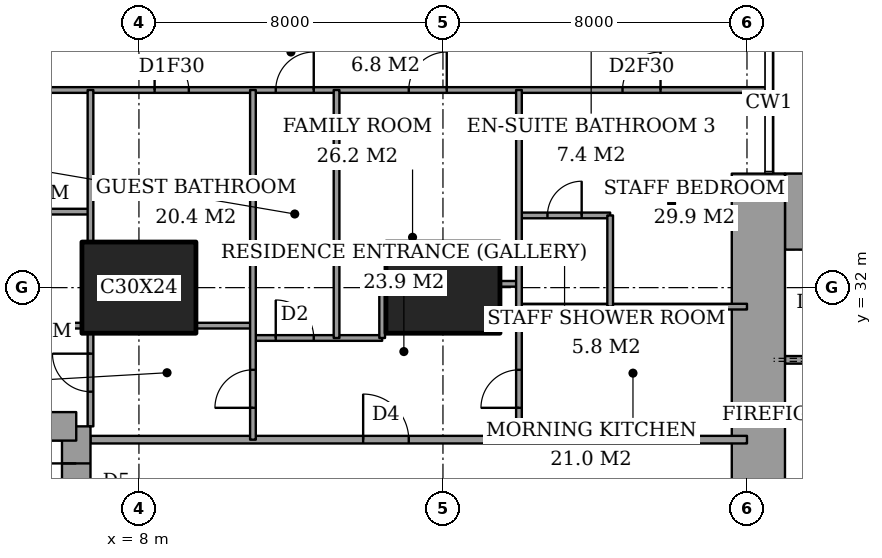
"""IFC4 building model, lengths in metres.
Left out: names, types, materials, properties, quantities, classifications, styles, units other than length and angle.
Written with IfcOpenShell. Run it as: python <this file> out.ifc"""

import sys

from ifc_helpers import new_model, si_unit, direction, frame, frame_2d, origin, origin_2d, place, context, subcontext, project, spatial, rectangle, extrude, element, fill, save


model = new_model("IFC4")
c1 = context("Model", 3, precision=1e-05, world=origin(), true_north=direction((0.0, 1.0)))
c2 = subcontext(c1, "Body", "Model", "MODEL_VIEW")
j1 = project(units=[si_unit("LENGTHUNIT", "METRE"), si_unit("PLANEANGLEUNIT", "RADIAN")], contexts=[c1])
p1 = place(None, origin())
s1 = spatial("IfcSite", under=j1, at=p1, CompositionType="ELEMENT")
p2 = place(p1, origin())
s2 = spatial("IfcBuilding", under=s1, at=p2, CompositionType="ELEMENT")
p3 = place(p2, frame((0.0, 0.0, 110.6)))
s3 = spatial("IfcBuildingStorey", under=s2, at=p3, CompositionType="ELEMENT", Elevation=110.6)
for number, where, z_axis, x_axis in (
    (1, (8.0, 32.0, 0.0), (0.0, 0.0, 1.0), (1.0, 0.0, 0.0)),
    (2, (16.0, 32.0, 0.0), (0.0, 0.0, 1.0), (1.0, 0.0, 0.0)),
):
    element("IfcColumn", number, at=place(p3, frame(where, z_axis=z_axis, x_axis=x_axis)), inside=s3, PredefinedType="COLUMN", context=c2, shape_type="SweptSolid", body=[
        extrude(rectangle(XDim=3.0, YDim=2.4, at=origin_2d()), origin(), (0.0, 0.0, 1.0), 3.6),
    ])
p4 = place(p3, frame((25.0, 34.0, 0.0), z_axis=(0.0, 0.0, 1.0), x_axis=(1.0, 0.0, 0.0)))
e3 = element("IfcWall", 3, at=p4, inside=s3, PredefinedType="SHEAR", context=c2, shape_type="SweptSolid", body=[
    extrude(rectangle(XDim=3.15, YDim=2.0, at=frame_2d((1.575, 0.0))), origin(), (0.0, 0.0, 1.0), 3.6),
])
p5 = place(p3, frame((24.3, 23.15, 0.0), z_axis=(0.0, 0.0, 1.0), x_axis=(0.0, 1.0, 0.0)))
e4 = element("IfcWall", 4, at=p5, inside=s3, PredefinedType="SHEAR", context=c2, shape_type="SweptSolid", body=[
    extrude(rectangle(XDim=11.85, YDim=1.4, at=frame_2d((5.925, 0.0))), origin(), (0.0, 0.0, 1.0), 3.6),
])
p6 = place(p5, frame((0.75, 0.0, 0.0)))
e5 = element("IfcOpeningElement", 5, at=p6, cuts=e4, PredefinedType="OPENING", context=c2, shape_type="SweptSolid", body=[
    extrude(rectangle(XDim=1.8, YDim=2.4, at=frame_2d((0.9, 1.2))), frame((0.0, 0.71, 0.0), z_axis=(0.0, -1.0, 0.0), x_axis=(1.0, 0.0, 0.0)), (0.0, 0.0, 1.0), 1.42),
])
p7 = place(p3, frame((6.35, 19.65, 0.0), z_axis=(0.0, 0.0, 1.0), x_axis=(0.0, 1.0, 0.0)))
e6 = element("IfcWall", 6, at=p7, inside=s3, PredefinedType="SHEAR", context=c2, shape_type="SweptSolid", body=[
    extrude(rectangle(XDim=8.7, YDim=0.75, at=frame_2d((4.35, 0.0))), origin(), (0.0, 0.0, 1.0), 3.6),
])
p8 = place(p7, frame((6.725, 0.0, 0.0)))
e7 = element("IfcOpeningElement", 7, at=p8, cuts=e6, PredefinedType="OPENING", context=c2, shape_type="SweptSolid", body=[
    extrude(rectangle(XDim=1.0, YDim=2.1, at=frame_2d((0.5, 1.05))), frame((0.0, 0.385, 0.0), z_axis=(0.0, -1.0, 0.0), x_axis=(1.0, 0.0, 0.0)), (0.0, 0.0, 1.0), 0.77),
])
p9 = place(p3, frame((6.35, 28.35, 0.0), z_axis=(0.0, 0.0, 1.0), x_axis=(-1.0, 0.0, 0.0)))
e8 = element("IfcWall", 8, at=p9, inside=s3, PredefinedType="SHEAR", context=c2, shape_type="SweptSolid", body=[
    extrude(rectangle(XDim=4.45, YDim=0.75, at=frame_2d((2.225, 0.0))), origin(), (0.0, 0.0, 1.0), 3.6),
])
p10 = place(p3, frame((6.725, 28.0, 0.0), z_axis=(0.0, 0.0, 1.0), x_axis=(1.0, 0.0, 0.0)))
e9 = element("IfcWall", 9, at=p10, inside=s3, PredefinedType="PARTITIONING", context=c2, shape_type="SweptSolid", body=[
    extrude(rectangle(XDim=17.275, YDim=0.2, at=frame_2d((8.637, 0.0))), origin(), (0.0, 0.0, 1.0), 3.35),
])
p11 = place(p10, frame((7.175, 0.0, 0.0)))
e10 = element("IfcOpeningElement", 10, at=p11, cuts=e9, PredefinedType="OPENING", context=c2, shape_type="SweptSolid", body=[
    extrude(rectangle(XDim=1.2, YDim=2.4, at=frame_2d((0.6, 1.2))), frame((0.0, 0.11, 0.0), z_axis=(0.0, -1.0, 0.0), x_axis=(1.0, 0.0, 0.0)), (0.0, 0.0, 1.0), 0.22),
])
p12 = place(p3, frame((11.0, 30.675, 0.0), z_axis=(0.0, 0.0, 1.0), x_axis=(1.0, 0.0, 0.0)))
e11 = element("IfcWall", 11, at=p12, inside=s3, PredefinedType="PARTITIONING", context=c2, shape_type="SweptSolid", body=[
    extrude(rectangle(XDim=3.4, YDim=0.15, at=frame_2d((1.7, 0.0))), origin(), (0.0, 0.0, 1.0), 3.35),
])
p13 = place(p12, frame((0.6, 0.0, 0.0)))
e12 = element("IfcOpeningElement", 12, at=p13, cuts=e11, PredefinedType="OPENING", context=c2, shape_type="SweptSolid", body=[
    extrude(rectangle(XDim=1.0, YDim=2.1, at=frame_2d((0.5, 1.05))), frame((0.0, 0.085, 0.0), z_axis=(0.0, -1.0, 0.0), x_axis=(1.0, 0.0, 0.0)), (0.0, 0.0, 1.0), 0.17),
])
p14 = place(p3, frame((1.35, 31.0, 0.0), z_axis=(0.0, 0.0, 1.0), x_axis=(1.0, 0.0, 0.0)))
e13 = element("IfcWall", 13, at=p14, inside=s3, PredefinedType="PARTITIONING", context=c2, shape_type="SweptSolid", body=[
    extrude(rectangle(XDim=5.15, YDim=0.15, at=frame_2d((2.575, 0.0))), origin(), (0.0, 0.0, 1.0), 3.35),
])
p15 = place(p3, frame((9.5, 31.0, 0.0), z_axis=(0.0, 0.0, 1.0), x_axis=(1.0, 0.0, 0.0)))
e14 = element("IfcWall", 14, at=p15, inside=s3, PredefinedType="PARTITIONING", context=c2, shape_type="SweptSolid", body=[
    extrude(rectangle(XDim=1.5, YDim=0.15, at=frame_2d((0.75, 0.0))), origin(), (0.0, 0.0, 1.0), 3.35),
])
p16 = place(p3, frame((18.0, 31.5, 0.0), z_axis=(0.0, 0.0, 1.0), x_axis=(1.0, 0.0, 0.0)))
e15 = element("IfcWall", 15, at=p16, inside=s3, PredefinedType="PARTITIONING", context=c2, shape_type="SweptSolid", body=[
    extrude(rectangle(XDim=6.0, YDim=0.15, at=frame_2d((3.0, 0.0))), origin(), (0.0, 0.0, 1.0), 3.35),
])
p17 = place(p3, frame((17.5, 32.1, 0.0), z_axis=(0.0, 0.0, 1.0), x_axis=(1.0, 0.0, 0.0)))
e16 = element("IfcWall", 16, at=p17, inside=s3, PredefinedType="PARTITIONING", context=c2, shape_type="SweptSolid", body=[
    extrude(rectangle(XDim=0.5, YDim=0.15, at=frame_2d((0.25, 0.0))), origin(), (0.0, 0.0, 1.0), 2.634),
])
p18 = place(p3, frame((18.0, 33.9, 0.0), z_axis=(0.0, 0.0, 1.0), x_axis=(1.0, 0.0, 0.0)))
e17 = element("IfcWall", 17, at=p18, inside=s3, PredefinedType="PARTITIONING", context=c2, shape_type="SweptSolid", body=[
    extrude(rectangle(XDim=2.4, YDim=0.15, at=frame_2d((1.2, 0.0))), origin(), (0.0, 0.0, 1.0), 3.35),
])
p19 = place(p18, frame((0.75, 0.0, 0.0)))
e18 = element("IfcOpeningElement", 18, at=p19, cuts=e17, PredefinedType="OPENING", context=c2, shape_type="SweptSolid", body=[
    extrude(rectangle(XDim=0.9, YDim=2.1, at=frame_2d((0.45, 1.05))), frame((0.0, 0.085, 0.0), z_axis=(0.0, -1.0, 0.0), x_axis=(1.0, 0.0, 0.0)), (0.0, 0.0, 1.0), 0.17),
])
p20 = place(p3, frame((4.125, 34.0, 0.0), z_axis=(0.0, 0.0, 1.0), x_axis=(1.0, 0.0, 0.0)))
e19 = element("IfcWall", 19, at=p20, inside=s3, PredefinedType="PARTITIONING", context=c2, shape_type="SweptSolid", body=[
    extrude(rectangle(XDim=2.6, YDim=0.15, at=frame_2d((1.3, 0.0))), origin(), (0.0, 0.0, 1.0), 3.35),
])
p21 = place(p3, frame((-0.45, 37.2, 0.0), z_axis=(0.0, 0.0, 1.0), x_axis=(1.0, 0.0, 0.0)))
e20 = element("IfcWall", 20, at=p21, inside=s3, PredefinedType="PARTITIONING", context=c2, shape_type="SweptSolid", body=[
    extrude(rectangle(XDim=25.011, YDim=0.15, at=frame_2d((12.505, 0.0))), origin(), (0.0, 0.0, 1.0), 3.35),
])
p22 = place(p21, frame((12.05, 0.0, 0.0)))
e21 = element("IfcOpeningElement", 21, at=p22, cuts=e20, PredefinedType="OPENING", context=c2, shape_type="SweptSolid", body=[
    extrude(rectangle(XDim=1.0, YDim=2.1, at=frame_2d((0.5, 1.05))), frame((0.0, 0.085, 0.0), z_axis=(0.0, -1.0, 0.0), x_axis=(1.0, 0.0, 0.0)), (0.0, 0.0, 1.0), 0.17),
])
p23 = place(p21, frame((3.087, 0.0, 0.0)))
e22 = element("IfcOpeningElement", 22, at=p23, cuts=e20, PredefinedType="OPENING", context=c2, shape_type="SweptSolid", body=[
    extrude(rectangle(XDim=1.0, YDim=2.1, at=frame_2d((0.5, 1.05))), frame((0.0, 0.085, 0.0), z_axis=(0.0, -1.0, 0.0), x_axis=(1.0, 0.0, 0.0)), (0.0, 0.0, 1.0), 0.17),
])
p24 = place(p21, frame((8.863, 0.0, 0.0)))
e23 = element("IfcOpeningElement", 23, at=p24, cuts=e20, PredefinedType="OPENING", context=c2, shape_type="SweptSolid", body=[
    extrude(rectangle(XDim=0.9, YDim=2.1, at=frame_2d((0.45, 1.05))), frame((0.0, 0.085, 0.0), z_axis=(0.0, -1.0, 0.0), x_axis=(1.0, 0.0, 0.0)), (0.0, 0.0, 1.0), 0.17),
])
p25 = place(p21, frame((15.55, 0.0, 0.0)))
e24 = element("IfcOpeningElement", 24, at=p25, cuts=e20, PredefinedType="OPENING", context=c2, shape_type="SweptSolid", body=[
    extrude(rectangle(XDim=1.0, YDim=2.1, at=frame_2d((0.5, 1.05))), frame((0.0, 0.085, 0.0), z_axis=(0.0, -1.0, 0.0), x_axis=(1.0, 0.0, 0.0)), (0.0, 0.0, 1.0), 0.17),
])
p26 = place(p21, frame((21.175, 0.0, 0.0)))
e25 = element("IfcOpeningElement", 25, at=p26, cuts=e20, PredefinedType="OPENING", context=c2, shape_type="SweptSolid", body=[
    extrude(rectangle(XDim=1.0, YDim=2.1, at=frame_2d((0.5, 1.05))), frame((0.0, 0.085, 0.0), z_axis=(0.0, -1.0, 0.0), x_axis=(1.0, 0.0, 0.0)), (0.0, 0.0, 1.0), 0.17),
])
p27 = place(p3, frame((6.725, 28.35, 0.0), z_axis=(0.0, 0.0, 1.0), x_axis=(0.0, 1.0, 0.0)))
e26 = element("IfcWall", 26, at=p27, inside=s3, PredefinedType="PARTITIONING", context=c2, shape_type="SweptSolid", body=[
    extrude(rectangle(XDim=2.45, YDim=0.15, at=frame_2d((1.225, 0.0))), origin(), (0.0, 0.0, 1.0), 3.35),
])
p28 = place(p27, frame((0.913, 0.0, 0.0)))
e27 = element("IfcOpeningElement", 27, at=p28, cuts=e26, PredefinedType="OPENING", context=c2, shape_type="SweptSolid", body=[
    extrude(rectangle(XDim=1.0, YDim=2.1, at=frame_2d((0.5, 1.05))), frame((0.0, 0.085, 0.0), z_axis=(0.0, -1.0, 0.0), x_axis=(1.0, 0.0, 0.0)), (0.0, 0.0, 1.0), 0.17),
])
p29 = place(p3, frame((6.725, 33.2, 0.0), z_axis=(0.0, 0.0, 1.0), x_axis=(0.0, 1.0, 0.0)))
e28 = element("IfcWall", 28, at=p29, inside=s3, PredefinedType="PARTITIONING", context=c2, shape_type="SweptSolid", body=[
    extrude(rectangle(XDim=4.0, YDim=0.15, at=frame_2d((2.0, 0.0))), origin(), (0.0, 0.0, 1.0), 3.35),
])
p30 = place(p3, frame((11.0, 28.0, 0.0), z_axis=(0.0, 0.0, 1.0), x_axis=(0.0, 1.0, 0.0)))
e29 = element("IfcWall", 29, at=p30, inside=s3, PredefinedType="PARTITIONING", context=c2, shape_type="SweptSolid", body=[
    extrude(rectangle(XDim=9.2, YDim=0.15, at=frame_2d((4.6, 0.0))), origin(), (0.0, 0.0, 1.0), 3.35),
])
p31 = place(p30, frame((0.837, 0.0, 0.0)))
e30 = element("IfcOpeningElement", 30, at=p31, cuts=e29, PredefinedType="OPENING", context=c2, shape_type="SweptSolid", body=[
    extrude(rectangle(XDim=1.0, YDim=2.1, at=frame_2d((0.5, 1.05))), frame((0.0, 0.085, 0.0), z_axis=(0.0, -1.0, 0.0), x_axis=(1.0, 0.0, 0.0)), (0.0, 0.0, 1.0), 0.17),
])
p32 = place(p3, frame((13.2, 30.675, 0.0), z_axis=(0.0, 0.0, 1.0), x_axis=(0.0, 1.0, 0.0)))
e31 = element("IfcWall", 31, at=p32, inside=s3, PredefinedType="PARTITIONING", context=c2, shape_type="SweptSolid", body=[
    extrude(rectangle(XDim=6.525, YDim=0.15, at=frame_2d((3.262, 0.0))), origin(), (0.0, 0.0, 1.0), 3.35),
])
p33 = place(p3, frame((14.4, 30.675, 0.0), z_axis=(0.0, 0.0, 1.0), x_axis=(0.0, 1.0, 0.0)))
e32 = element("IfcWall", 32, at=p33, inside=s3, PredefinedType="PARTITIONING", context=c2, shape_type="SweptSolid", body=[
    extrude(rectangle(XDim=1.425, YDim=0.15, at=frame_2d((0.712, 0.0))), origin(), (0.0, 0.0, 1.0), 3.35),
])
p34 = place(p3, frame((18.0, 28.0, 0.0), z_axis=(0.0, 0.0, 1.0), x_axis=(0.0, 1.0, 0.0)))
e33 = element("IfcWall", 33, at=p34, inside=s3, PredefinedType="PARTITIONING", context=c2, shape_type="SweptSolid", body=[
    extrude(rectangle(XDim=9.2, YDim=0.15, at=frame_2d((4.6, 0.0))), origin(), (0.0, 0.0, 1.0), 3.35),
])
p35 = place(p34, frame((0.837, 0.0, 0.0)))
e34 = element("IfcOpeningElement", 34, at=p35, cuts=e33, PredefinedType="OPENING", context=c2, shape_type="SweptSolid", body=[
    extrude(rectangle(XDim=1.0, YDim=2.1, at=frame_2d((0.5, 1.05))), frame((0.0, 0.085, 0.0), z_axis=(0.0, -1.0, 0.0), x_axis=(1.0, 0.0, 0.0)), (0.0, 0.0, 1.0), 0.17),
])
p36 = place(p3, frame((20.4, 31.5, 0.0), z_axis=(0.0, 0.0, 1.0), x_axis=(0.0, 1.0, 0.0)))
e35 = element("IfcWall", 35, at=p36, inside=s3, PredefinedType="PARTITIONING", context=c2, shape_type="SweptSolid", body=[
    extrude(rectangle(XDim=2.4, YDim=0.15, at=frame_2d((1.2, 0.0))), origin(), (0.0, 0.0, 1.0), 3.35),
])
p37 = place(p3, frame((25.0, 30.1, 0.0), z_axis=(0.0, 0.0, 1.0), x_axis=(1.0, 0.0, 0.0)))
e36 = element("IfcWall", 36, at=p37, inside=s3, PredefinedType="PARTITIONING", context=c2, shape_type="SweptSolid", body=[
    extrude(rectangle(XDim=12.7, YDim=0.2, at=frame_2d((6.35, 0.0))), origin(), (0.0, 0.0, 1.0), 3.6),
])
p38 = place(p37, frame((0.9, 0.0, 0.0)))
e37 = element("IfcOpeningElement", 37, at=p38, cuts=e36, PredefinedType="OPENING", context=c2, shape_type="SweptSolid", body=[
    extrude(rectangle(XDim=1.2, YDim=2.1, at=frame_2d((0.6, 1.05))), frame((0.0, 0.11, 0.0), z_axis=(0.0, -1.0, 0.0), x_axis=(1.0, 0.0, 0.0)), (0.0, 0.0, 1.0), 0.22),
])
p39 = place(p22, origin())
e38 = element("IfcDoor", 38, at=p39, inside=s3, OperationType="SINGLE_SWING_LEFT", PredefinedType="DOOR", context=c2, shape_type="SweptSolid", body=[
    extrude(rectangle(XDim=1.0, YDim=2.1, at=frame_2d((0.5, 1.05))), frame((0.0, 0.025, 0.0), z_axis=(0.0, -1.0, 0.0), x_axis=(1.0, 0.0, 0.0)), (0.0, 0.0, 1.0), 0.05),
])
fill(e21, e38)
p40 = place(p28, origin())
e39 = element("IfcDoor", 39, at=p40, inside=s3, OperationType="SINGLE_SWING_LEFT", PredefinedType="DOOR", context=c2, shape_type="SweptSolid", body=[
    extrude(rectangle(XDim=1.0, YDim=2.1, at=frame_2d((0.5, 1.05))), frame((0.0, 0.025, 0.0), z_axis=(0.0, -1.0, 0.0), x_axis=(1.0, 0.0, 0.0)), (0.0, 0.0, 1.0), 0.05),
])
fill(e27, e39)
p41 = place(p24, origin())
e40 = element("IfcDoor", 40, at=p41, inside=s3, OperationType="SINGLE_SWING_RIGHT", PredefinedType="DOOR", context=c2, shape_type="SweptSolid", body=[
    extrude(rectangle(XDim=0.9, YDim=2.1, at=frame_2d((0.45, 1.05))), frame((0.0, 0.025, 0.0), z_axis=(0.0, -1.0, 0.0), x_axis=(1.0, 0.0, 0.0)), (0.0, 0.0, 1.0), 0.05),
])
fill(e23, e40)
p42 = place(p31, origin())
e41 = element("IfcDoor", 41, at=p42, inside=s3, OperationType="SINGLE_SWING_RIGHT", PredefinedType="DOOR", context=c2, shape_type="SweptSolid", body=[
    extrude(rectangle(XDim=1.0, YDim=2.1, at=frame_2d((0.5, 1.05))), frame((0.0, 0.025, 0.0), z_axis=(0.0, -1.0, 0.0), x_axis=(1.0, 0.0, 0.0)), (0.0, 0.0, 1.0), 0.05),
])
fill(e30, e41)
p43 = place(p11, origin())
e42 = element("IfcDoor", 42, at=p43, inside=s3, OperationType="SINGLE_SWING_RIGHT", PredefinedType="DOOR", context=c2, shape_type="SweptSolid", body=[
    extrude(rectangle(XDim=1.2, YDim=2.4, at=frame_2d((0.6, 1.2))), frame((0.0, 0.025, 0.0), z_axis=(0.0, -1.0, 0.0), x_axis=(1.0, 0.0, 0.0)), (0.0, 0.0, 1.0), 0.05),
])
fill(e10, e42)
p44 = place(p13, origin())
e43 = element("IfcDoor", 43, at=p44, inside=s3, OperationType="SINGLE_SWING_RIGHT", PredefinedType="DOOR", context=c2, shape_type="SweptSolid", body=[
    extrude(rectangle(XDim=1.0, YDim=2.1, at=frame_2d((0.5, 1.05))), frame((0.0, 0.025, 0.0), z_axis=(0.0, -1.0, 0.0), x_axis=(1.0, 0.0, 0.0)), (0.0, 0.0, 1.0), 0.05),
])
fill(e12, e43)
p45 = place(p25, origin())
e44 = element("IfcDoor", 44, at=p45, inside=s3, OperationType="SINGLE_SWING_LEFT", PredefinedType="DOOR", context=c2, shape_type="SweptSolid", body=[
    extrude(rectangle(XDim=1.0, YDim=2.1, at=frame_2d((0.5, 1.05))), frame((0.0, 0.025, 0.0), z_axis=(0.0, -1.0, 0.0), x_axis=(1.0, 0.0, 0.0)), (0.0, 0.0, 1.0), 0.05),
])
fill(e24, e44)
p46 = place(p19, origin())
e45 = element("IfcDoor", 45, at=p46, inside=s3, OperationType="SINGLE_SWING_LEFT", PredefinedType="DOOR", context=c2, shape_type="SweptSolid", body=[
    extrude(rectangle(XDim=0.9, YDim=2.1, at=frame_2d((0.45, 1.05))), frame((0.0, 0.025, 0.0), z_axis=(0.0, -1.0, 0.0), x_axis=(1.0, 0.0, 0.0)), (0.0, 0.0, 1.0), 0.05),
])
fill(e18, e45)
p47 = place(p26, origin())
e46 = element("IfcDoor", 46, at=p47, inside=s3, OperationType="SINGLE_SWING_LEFT", PredefinedType="DOOR", context=c2, shape_type="SweptSolid", body=[
    extrude(rectangle(XDim=1.0, YDim=2.1, at=frame_2d((0.5, 1.05))), frame((0.0, 0.025, 0.0), z_axis=(0.0, -1.0, 0.0), x_axis=(1.0, 0.0, 0.0)), (0.0, 0.0, 1.0), 0.05),
])
fill(e25, e46)
p48 = place(p35, origin())
e47 = element("IfcDoor", 47, at=p48, inside=s3, OperationType="SINGLE_SWING_RIGHT", PredefinedType="DOOR", context=c2, shape_type="SweptSolid", body=[
    extrude(rectangle(XDim=1.0, YDim=2.1, at=frame_2d((0.5, 1.05))), frame((0.0, 0.025, 0.0), z_axis=(0.0, -1.0, 0.0), x_axis=(1.0, 0.0, 0.0)), (0.0, 0.0, 1.0), 0.05),
])
fill(e34, e47)
p49 = place(p8, origin())
e48 = element("IfcDoor", 48, at=p49, inside=s3, OperationType="SINGLE_SWING_LEFT", PredefinedType="DOOR", context=c2, shape_type="SweptSolid", body=[
    extrude(rectangle(XDim=1.0, YDim=2.1, at=frame_2d((0.5, 1.05))), frame((0.0, 0.025, 0.0), z_axis=(0.0, -1.0, 0.0), x_axis=(1.0, 0.0, 0.0)), (0.0, 0.0, 1.0), 0.05),
])
fill(e7, e48)
save(model, sys.argv[1])
